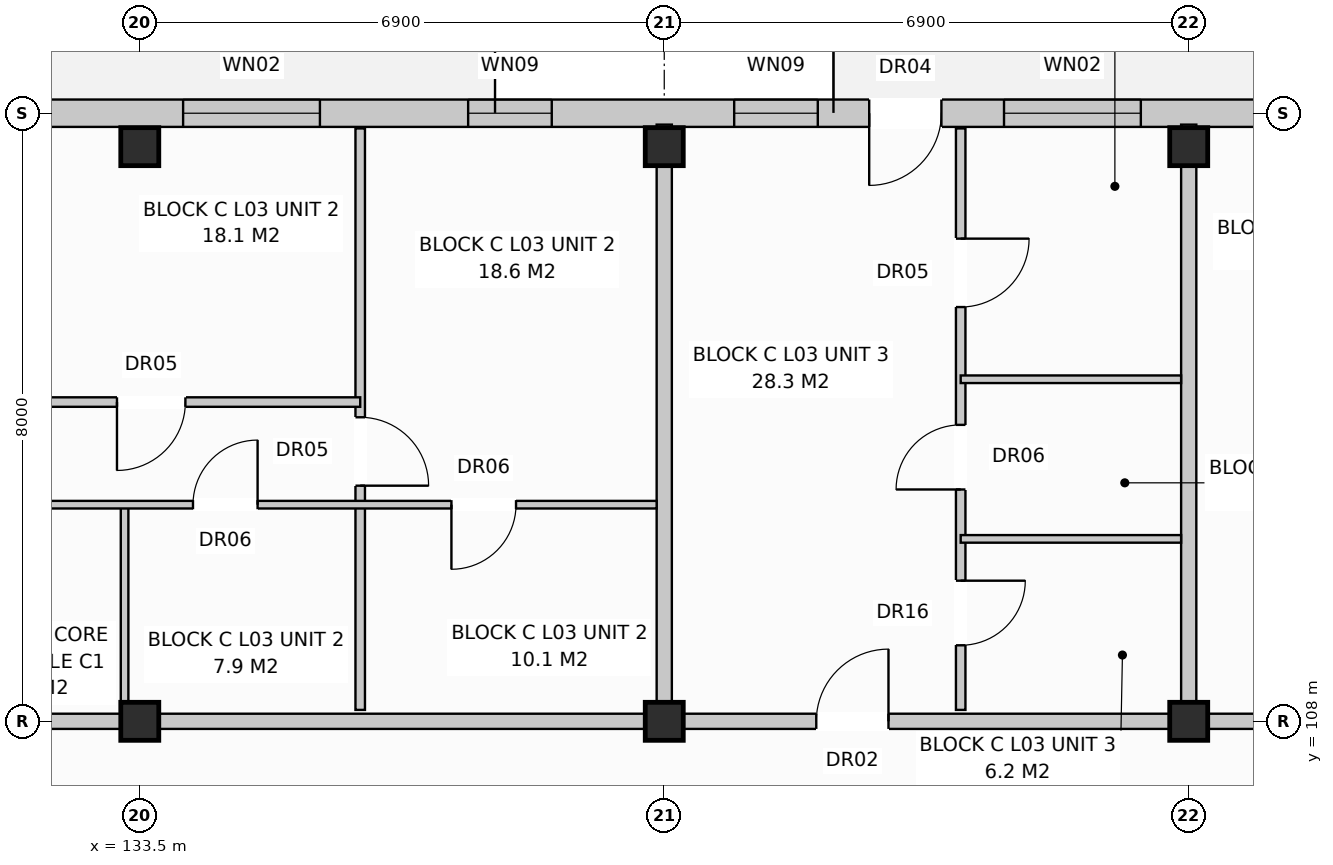
"""IFC4 building model, lengths in metres.
Left out: names, types, materials, properties, quantities, classifications, styles, units other than length and angle.
Written with IfcOpenShell. Run it as: python <this file> out.ifc"""

import sys

from ifc_helpers import new_model, si_unit, direction, frame, frame_2d, origin, origin_with_axes, origin_2d, place, context, subcontext, project, spatial, rectangle, extrude, element, fill, save


model = new_model("IFC4")
c1 = context("Model", 3, precision=1e-05, world=origin(), true_north=direction((0.0, 1.0)))
c2 = subcontext(c1, "Body", "Model", "MODEL_VIEW")
j1 = project(units=[si_unit("LENGTHUNIT", "METRE"), si_unit("PLANEANGLEUNIT", "RADIAN")], contexts=[c1])
p1 = place(None, origin())
s1 = spatial("IfcSite", under=j1, at=p1, CompositionType="ELEMENT")
p2 = place(p1, origin())
s2 = spatial("IfcBuilding", under=s1, at=p2, CompositionType="ELEMENT")
p3 = place(p2, frame((0.0, 0.0, 11.2)))
s3 = spatial("IfcBuildingStorey", under=s2, at=p3, CompositionType="ELEMENT", Elevation=11.2)
for number, where, z_axis, x_axis in (
    (1, (133.5, 108.0, 0.0), (0.0, 0.0, 1.0), (1.0, 0.0, 0.0)),
    (2, (133.5, 115.56, 0.0), (0.0, 0.0, 1.0), (1.0, 0.0, 0.0)),
    (3, (140.4, 108.0, 0.0), (0.0, 0.0, 1.0), (1.0, 0.0, 0.0)),
    (4, (140.4, 115.56, 0.0), (0.0, 0.0, 1.0), (1.0, 0.0, 0.0)),
    (5, (147.3, 108.0, 0.0), (0.0, 0.0, 1.0), (1.0, 0.0, 0.0)),
    (6, (147.3, 115.56, 0.0), (0.0, 0.0, 1.0), (1.0, 0.0, 0.0)),
):
    element("IfcColumn", number, at=place(p3, frame(where, z_axis=z_axis, x_axis=x_axis)), inside=s3, PredefinedType="COLUMN", context=c2, shape_type="SweptSolid", body=[
        extrude(rectangle(XDim=0.5, YDim=0.5, at=origin_2d()), origin(), (0.0, 0.0, 1.0), 3.2),
    ])
p4 = place(p3, frame((112.97, 116.0, 0.0), z_axis=(0.0, 0.0, 1.0), x_axis=(1.0, 0.0, 0.0)))
e7 = element("IfcWall", 7, at=p4, inside=s3, PredefinedType="STANDARD", context=c2, shape_type="SweptSolid", body=[
    extrude(rectangle(XDim=54.86, YDim=0.36, at=frame_2d((27.43, 0.0))), origin(), (0.0, 0.0, 1.0), 2.94),
])
p5 = place(p4, frame((2.497, 0.0, 0.0)))
e8 = element("IfcOpeningElement", 8, at=p5, cuts=e7, PredefinedType="OPENING", context=c2, shape_type="SweptSolid", body=[
    extrude(rectangle(XDim=0.95, YDim=2.1, at=frame_2d((0.475, 1.05))), frame((0.0, 0.192, 0.0), z_axis=(0.0, -1.0, 0.0), x_axis=(1.0, 0.0, 0.0)), (0.0, 0.0, 1.0), 0.384),
])
p6 = place(p4, frame((17.026, 0.0, 0.0)))
e9 = element("IfcOpeningElement", 9, at=p6, cuts=e7, PredefinedType="OPENING", context=c2, shape_type="SweptSolid", body=[
    extrude(rectangle(XDim=0.95, YDim=2.1, at=frame_2d((0.475, 1.05))), frame((0.0, 0.192, 0.0), z_axis=(0.0, -1.0, 0.0), x_axis=(1.0, 0.0, 0.0)), (0.0, 0.0, 1.0), 0.384),
])
p7 = place(p4, frame((30.126, 0.0, 0.0)))
e10 = element("IfcOpeningElement", 10, at=p7, cuts=e7, PredefinedType="OPENING", context=c2, shape_type="SweptSolid", body=[
    extrude(rectangle(XDim=0.95, YDim=2.1, at=frame_2d((0.475, 1.05))), frame((0.0, 0.192, 0.0), z_axis=(0.0, -1.0, 0.0), x_axis=(1.0, 0.0, 0.0)), (0.0, 0.0, 1.0), 0.384),
])
p8 = place(p4, frame((44.226, 0.0, 0.0)))
e11 = element("IfcOpeningElement", 11, at=p8, cuts=e7, PredefinedType="OPENING", context=c2, shape_type="SweptSolid", body=[
    extrude(rectangle(XDim=0.95, YDim=2.1, at=frame_2d((0.475, 1.05))), frame((0.0, 0.192, 0.0), z_axis=(0.0, -1.0, 0.0), x_axis=(1.0, 0.0, 0.0)), (0.0, 0.0, 1.0), 0.384),
])
p9 = place(p4, frame((0.645, 0.0, 0.85)))
e12 = element("IfcOpeningElement", 12, at=p9, cuts=e7, PredefinedType="OPENING", context=c2, shape_type="SweptSolid", body=[
    extrude(rectangle(XDim=1.55, YDim=1.55, at=frame_2d((0.775, 0.775))), frame((0.0, 0.192, 0.0), z_axis=(0.0, -1.0, 0.0), x_axis=(1.0, 0.0, 0.0)), (0.0, 0.0, 1.0), 0.384),
])
p10 = place(p4, frame((4.3, 0.0, 0.8)))
e13 = element("IfcOpeningElement", 13, at=p10, cuts=e7, PredefinedType="OPENING", context=c2, shape_type="SweptSolid", body=[
    extrude(rectangle(XDim=1.8, YDim=1.7, at=frame_2d((0.9, 0.85))), frame((0.0, 0.192, 0.0), z_axis=(0.0, -1.0, 0.0), x_axis=(1.0, 0.0, 0.0)), (0.0, 0.0, 1.0), 0.384),
])
p11 = place(p4, frame((9.35, 0.0, 0.72)))
e14 = element("IfcOpeningElement", 14, at=p11, cuts=e7, PredefinedType="OPENING", context=c2, shape_type="SweptSolid", body=[
    extrude(rectangle(XDim=1.1, YDim=1.5, at=frame_2d((0.55, 0.75))), frame((0.0, 0.192, 0.0), z_axis=(0.0, -1.0, 0.0), x_axis=(1.0, 0.0, 0.0)), (0.0, 0.0, 1.0), 0.384),
])
p12 = place(p4, frame((15.05, 0.0, 0.72)))
e15 = element("IfcOpeningElement", 15, at=p12, cuts=e7, PredefinedType="OPENING", context=c2, shape_type="SweptSolid", body=[
    extrude(rectangle(XDim=1.1, YDim=1.5, at=frame_2d((0.55, 0.75))), frame((0.0, 0.192, 0.0), z_axis=(0.0, -1.0, 0.0), x_axis=(1.0, 0.0, 0.0)), (0.0, 0.0, 1.0), 0.384),
])
p13 = place(p4, frame((21.1, 0.0, 0.8)))
e16 = element("IfcOpeningElement", 16, at=p13, cuts=e7, PredefinedType="OPENING", context=c2, shape_type="SweptSolid", body=[
    extrude(rectangle(XDim=1.8, YDim=1.7, at=frame_2d((0.9, 0.85))), frame((0.0, 0.192, 0.0), z_axis=(0.0, -1.0, 0.0), x_axis=(1.0, 0.0, 0.0)), (0.0, 0.0, 1.0), 0.384),
])
p14 = place(p4, frame((24.85, 0.0, 0.72)))
e17 = element("IfcOpeningElement", 17, at=p14, cuts=e7, PredefinedType="OPENING", context=c2, shape_type="SweptSolid", body=[
    extrude(rectangle(XDim=1.1, YDim=1.5, at=frame_2d((0.55, 0.75))), frame((0.0, 0.192, 0.0), z_axis=(0.0, -1.0, 0.0), x_axis=(1.0, 0.0, 0.0)), (0.0, 0.0, 1.0), 0.384),
])
p15 = place(p4, frame((28.35, 0.0, 0.72)))
e18 = element("IfcOpeningElement", 18, at=p15, cuts=e7, PredefinedType="OPENING", context=c2, shape_type="SweptSolid", body=[
    extrude(rectangle(XDim=1.1, YDim=1.5, at=frame_2d((0.55, 0.75))), frame((0.0, 0.192, 0.0), z_axis=(0.0, -1.0, 0.0), x_axis=(1.0, 0.0, 0.0)), (0.0, 0.0, 1.0), 0.384),
])
p16 = place(p4, frame((31.9, 0.0, 0.8)))
e19 = element("IfcOpeningElement", 19, at=p16, cuts=e7, PredefinedType="OPENING", context=c2, shape_type="SweptSolid", body=[
    extrude(rectangle(XDim=1.8, YDim=1.7, at=frame_2d((0.9, 0.85))), frame((0.0, 0.192, 0.0), z_axis=(0.0, -1.0, 0.0), x_axis=(1.0, 0.0, 0.0)), (0.0, 0.0, 1.0), 0.384),
])
p17 = place(p4, frame((35.55, 0.0, 0.72)))
e20 = element("IfcOpeningElement", 20, at=p17, cuts=e7, PredefinedType="OPENING", context=c2, shape_type="SweptSolid", body=[
    extrude(rectangle(XDim=1.9, YDim=1.85, at=frame_2d((0.95, 0.925))), frame((0.0, 0.192, 0.0), z_axis=(0.0, -1.0, 0.0), x_axis=(1.0, 0.0, 0.0)), (0.0, 0.0, 1.0), 0.384),
])
p18 = place(p4, frame((39.25, 0.0, 0.72)))
e21 = element("IfcOpeningElement", 21, at=p18, cuts=e7, PredefinedType="OPENING", context=c2, shape_type="SweptSolid", body=[
    extrude(rectangle(XDim=1.1, YDim=1.5, at=frame_2d((0.55, 0.75))), frame((0.0, 0.192, 0.0), z_axis=(0.0, -1.0, 0.0), x_axis=(1.0, 0.0, 0.0)), (0.0, 0.0, 1.0), 0.384),
])
p19 = place(p4, frame((42.45, 0.0, 0.72)))
e22 = element("IfcOpeningElement", 22, at=p19, cuts=e7, PredefinedType="OPENING", context=c2, shape_type="SweptSolid", body=[
    extrude(rectangle(XDim=1.1, YDim=1.5, at=frame_2d((0.55, 0.75))), frame((0.0, 0.192, 0.0), z_axis=(0.0, -1.0, 0.0), x_axis=(1.0, 0.0, 0.0)), (0.0, 0.0, 1.0), 0.384),
])
p20 = place(p4, frame((45.75, 0.0, 0.72)))
e23 = element("IfcOpeningElement", 23, at=p20, cuts=e7, PredefinedType="OPENING", context=c2, shape_type="SweptSolid", body=[
    extrude(rectangle(XDim=1.9, YDim=1.85, at=frame_2d((0.95, 0.925))), frame((0.0, 0.192, 0.0), z_axis=(0.0, -1.0, 0.0), x_axis=(1.0, 0.0, 0.0)), (0.0, 0.0, 1.0), 0.384),
])
p21 = place(p4, frame((51.85, 0.0, 0.72)))
e24 = element("IfcOpeningElement", 24, at=p21, cuts=e7, PredefinedType="OPENING", context=c2, shape_type="SweptSolid", body=[
    extrude(rectangle(XDim=1.1, YDim=1.5, at=frame_2d((0.55, 0.75))), frame((0.0, 0.192, 0.0), z_axis=(0.0, -1.0, 0.0), x_axis=(1.0, 0.0, 0.0)), (0.0, 0.0, 1.0), 0.384),
])
p22 = place(p3, frame((140.4, 108.15, 0.0), z_axis=(0.0, 0.0, 1.0), x_axis=(0.0, 1.0, 0.0)))
e25 = element("IfcWall", 25, at=p22, inside=s3, PredefinedType="PARTITIONING", context=c2, shape_type="SweptSolid", body=[
    extrude(rectangle(XDim=7.7, YDim=0.2, at=frame_2d((3.85, 0.0))), origin(), (0.0, 0.0, 1.0), 2.94),
])
p23 = place(p3, frame((119.7, 108.0, 0.0), z_axis=(0.0, 0.0, 1.0), x_axis=(1.0, 0.0, 0.0)))
e26 = element("IfcWall", 26, at=p23, inside=s3, PredefinedType="PARTITIONING", context=c2, shape_type="SweptSolid", body=[
    extrude(rectangle(XDim=20.7, YDim=0.2, at=frame_2d((10.35, 0.0))), origin(), (0.0, 0.0, 1.0), 2.38),
])
p24 = place(p23, frame((2.4, 0.0, 0.0)))
e27 = element("IfcOpeningElement", 27, at=p24, cuts=e26, PredefinedType="OPENING", context=c2, shape_type="SweptSolid", body=[
    extrude(rectangle(XDim=0.95, YDim=2.15, at=frame_2d((0.475, 1.075))), frame((0.0, 0.112, 0.0), z_axis=(0.0, -1.0, 0.0), x_axis=(1.0, 0.0, 0.0)), (0.0, 0.0, 1.0), 0.224),
])
p25 = place(p3, frame((133.3, 108.15, 0.0), z_axis=(0.0, 0.0, 1.0), x_axis=(0.0, 1.0, 0.0)))
e28 = element("IfcWall", 28, at=p25, inside=s3, PredefinedType="PARTITIONING", context=c2, shape_type="SweptSolid", body=[
    extrude(rectangle(XDim=2.7, YDim=0.1, at=frame_2d((1.35, 0.0))), origin(), (0.0, 0.0, 1.0), 2.94),
])
p26 = place(p3, frame((136.4, 108.15, 0.0), z_axis=(0.0, 0.0, 1.0), x_axis=(0.0, 1.0, 0.0)))
e29 = element("IfcWall", 29, at=p26, inside=s3, PredefinedType="PARTITIONING", context=c2, shape_type="SweptSolid", body=[
    extrude(rectangle(XDim=7.65, YDim=0.125, at=frame_2d((3.825, 0.0))), origin(), (0.0, 0.0, 1.0), 2.94),
])
p27 = place(p26, frame((2.95, 0.0, 0.0)))
e30 = element("IfcOpeningElement", 30, at=p27, cuts=e29, PredefinedType="OPENING", context=c2, shape_type="SweptSolid", body=[
    extrude(rectangle(XDim=0.9, YDim=2.1, at=frame_2d((0.45, 1.05))), frame((0.0, 0.074, 0.0), z_axis=(0.0, -1.0, 0.0), x_axis=(1.0, 0.0, 0.0)), (0.0, 0.0, 1.0), 0.149),
])
p28 = place(p3, frame((126.0, 110.85, 0.0), z_axis=(0.0, 0.0, 1.0), x_axis=(1.0, 0.0, 0.0)))
e31 = element("IfcWall", 31, at=p28, inside=s3, PredefinedType="PARTITIONING", context=c2, shape_type="SweptSolid", body=[
    extrude(rectangle(XDim=14.3, YDim=0.1, at=frame_2d((7.15, 0.0))), origin(), (0.0, 0.0, 1.0), 2.94),
])
p29 = place(p28, frame((1.6, 0.0, 0.0)))
e32 = element("IfcOpeningElement", 32, at=p29, cuts=e31, PredefinedType="OPENING", context=c2, shape_type="SweptSolid", body=[
    extrude(rectangle(XDim=0.9, YDim=2.1, at=frame_2d((0.45, 1.05))), frame((0.0, 0.062, 0.0), z_axis=(0.0, -1.0, 0.0), x_axis=(1.0, 0.0, 0.0)), (0.0, 0.0, 1.0), 0.124),
])
p30 = place(p28, frame((5.1, 0.0, 0.0)))
e33 = element("IfcOpeningElement", 33, at=p30, cuts=e31, PredefinedType="OPENING", context=c2, shape_type="SweptSolid", body=[
    extrude(rectangle(XDim=0.85, YDim=2.05, at=frame_2d((0.425, 1.025))), frame((0.0, 0.062, 0.0), z_axis=(0.0, -1.0, 0.0), x_axis=(1.0, 0.0, 0.0)), (0.0, 0.0, 1.0), 0.124),
])
p31 = place(p28, frame((8.2, 0.0, 0.0)))
e34 = element("IfcOpeningElement", 34, at=p31, cuts=e31, PredefinedType="OPENING", context=c2, shape_type="SweptSolid", body=[
    extrude(rectangle(XDim=0.85, YDim=2.05, at=frame_2d((0.425, 1.025))), frame((0.0, 0.062, 0.0), z_axis=(0.0, -1.0, 0.0), x_axis=(1.0, 0.0, 0.0)), (0.0, 0.0, 1.0), 0.124),
])
p32 = place(p28, frame((11.6, 0.0, 0.0)))
e35 = element("IfcOpeningElement", 35, at=p32, cuts=e31, PredefinedType="OPENING", context=c2, shape_type="SweptSolid", body=[
    extrude(rectangle(XDim=0.85, YDim=2.05, at=frame_2d((0.425, 1.025))), frame((0.0, 0.062, 0.0), z_axis=(0.0, -1.0, 0.0), x_axis=(1.0, 0.0, 0.0)), (0.0, 0.0, 1.0), 0.124),
])
p33 = place(p3, frame((126.0, 112.2, 0.0), z_axis=(0.0, 0.0, 1.0), x_axis=(1.0, 0.0, 0.0)))
e36 = element("IfcWall", 36, at=p33, inside=s3, PredefinedType="PARTITIONING", context=c2, shape_type="SweptSolid", body=[
    extrude(rectangle(XDim=10.4, YDim=0.125, at=frame_2d((5.2, 0.0))), origin(), (0.0, 0.0, 1.0), 2.94),
])
p34 = place(p33, frame((2.0, 0.0, 0.0)))
e37 = element("IfcOpeningElement", 37, at=p34, cuts=e36, PredefinedType="OPENING", context=c2, shape_type="SweptSolid", body=[
    extrude(rectangle(XDim=0.9, YDim=2.1, at=frame_2d((0.45, 1.05))), frame((0.0, 0.074, 0.0), z_axis=(0.0, -1.0, 0.0), x_axis=(1.0, 0.0, 0.0)), (0.0, 0.0, 1.0), 0.149),
])
p35 = place(p33, frame((7.2, 0.0, 0.0)))
e38 = element("IfcOpeningElement", 38, at=p35, cuts=e36, PredefinedType="OPENING", context=c2, shape_type="SweptSolid", body=[
    extrude(rectangle(XDim=0.9, YDim=2.1, at=frame_2d((0.45, 1.05))), frame((0.0, 0.074, 0.0), z_axis=(0.0, -1.0, 0.0), x_axis=(1.0, 0.0, 0.0)), (0.0, 0.0, 1.0), 0.149),
])
p36 = place(p3, frame((147.3, 108.15, 0.0), z_axis=(0.0, 0.0, 1.0), x_axis=(0.0, 1.0, 0.0)))
e39 = element("IfcWall", 39, at=p36, inside=s3, PredefinedType="PARTITIONING", context=c2, shape_type="SweptSolid", body=[
    extrude(rectangle(XDim=7.7, YDim=0.2, at=frame_2d((3.85, 0.0))), origin(), (0.0, 0.0, 1.0), 2.94),
])
p37 = place(p3, frame((140.4, 108.0, 0.0), z_axis=(0.0, 0.0, 1.0), x_axis=(1.0, 0.0, 0.0)))
e40 = element("IfcWall", 40, at=p37, inside=s3, PredefinedType="PARTITIONING", context=c2, shape_type="SweptSolid", body=[
    extrude(rectangle(XDim=6.9, YDim=0.2, at=frame_2d((3.45, 0.0))), origin(), (0.0, 0.0, 1.0), 2.38),
])
p38 = place(p37, frame((2.0, 0.0, 0.0)))
e41 = element("IfcOpeningElement", 41, at=p38, cuts=e40, PredefinedType="OPENING", context=c2, shape_type="SweptSolid", body=[
    extrude(rectangle(XDim=0.95, YDim=2.15, at=frame_2d((0.475, 1.075))), frame((0.0, 0.112, 0.0), z_axis=(0.0, -1.0, 0.0), x_axis=(1.0, 0.0, 0.0)), (0.0, 0.0, 1.0), 0.224),
])
p39 = place(p3, frame((144.3, 108.15, 0.0), z_axis=(0.0, 0.0, 1.0), x_axis=(0.0, 1.0, 0.0)))
e42 = element("IfcWall", 42, at=p39, inside=s3, PredefinedType="PARTITIONING", context=c2, shape_type="SweptSolid", body=[
    extrude(rectangle(XDim=7.65, YDim=0.125, at=frame_2d((3.825, 0.0))), origin(), (0.0, 0.0, 1.0), 2.94),
])
p40 = place(p39, frame((0.85, 0.0, 0.0)))
e43 = element("IfcOpeningElement", 43, at=p40, cuts=e42, PredefinedType="OPENING", context=c2, shape_type="SweptSolid", body=[
    extrude(rectangle(XDim=0.85, YDim=2.1, at=frame_2d((0.425, 1.05))), frame((0.0, 0.074, 0.0), z_axis=(0.0, -1.0, 0.0), x_axis=(1.0, 0.0, 0.0)), (0.0, 0.0, 1.0), 0.149),
])
p41 = place(p39, frame((2.9, 0.0, 0.0)))
e44 = element("IfcOpeningElement", 44, at=p41, cuts=e42, PredefinedType="OPENING", context=c2, shape_type="SweptSolid", body=[
    extrude(rectangle(XDim=0.85, YDim=2.05, at=frame_2d((0.425, 1.025))), frame((0.0, 0.074, 0.0), z_axis=(0.0, -1.0, 0.0), x_axis=(1.0, 0.0, 0.0)), (0.0, 0.0, 1.0), 0.149),
])
p42 = place(p39, frame((5.3, 0.0, 0.0)))
e45 = element("IfcOpeningElement", 45, at=p42, cuts=e42, PredefinedType="OPENING", context=c2, shape_type="SweptSolid", body=[
    extrude(rectangle(XDim=0.9, YDim=2.1, at=frame_2d((0.45, 1.05))), frame((0.0, 0.074, 0.0), z_axis=(0.0, -1.0, 0.0), x_axis=(1.0, 0.0, 0.0)), (0.0, 0.0, 1.0), 0.149),
])
for number, where, z_axis, x_axis in (
    (46, (144.3, 110.4, 0.0), (0.0, 0.0, 1.0), (1.0, 0.0, 0.0)),
    (47, (144.3, 112.5, 0.0), (0.0, 0.0, 1.0), (1.0, 0.0, 0.0)),
):
    element("IfcWall", number, at=place(p3, frame(where, z_axis=z_axis, x_axis=x_axis)), inside=s3, PredefinedType="PARTITIONING", context=c2, shape_type="SweptSolid", body=[
        extrude(rectangle(XDim=2.9, YDim=0.1, at=frame_2d((1.45, 0.0))), origin(), (0.0, 0.0, 1.0), 2.94),
    ])
p43 = place(p3, frame((147.3, 108.0, 0.0), z_axis=(0.0, 0.0, 1.0), x_axis=(1.0, 0.0, 0.0)))
e48 = element("IfcWall", 48, at=p43, inside=s3, PredefinedType="PARTITIONING", context=c2, shape_type="SweptSolid", body=[
    extrude(rectangle(XDim=6.9, YDim=0.2, at=frame_2d((3.45, 0.0))), origin(), (0.0, 0.0, 1.0), 2.38),
])
p44 = place(p43, frame((2.0, 0.0, 0.0)))
e49 = element("IfcOpeningElement", 49, at=p44, cuts=e48, PredefinedType="OPENING", context=c2, shape_type="SweptSolid", body=[
    extrude(rectangle(XDim=0.95, YDim=2.15, at=frame_2d((0.475, 1.075))), frame((0.0, 0.112, 0.0), z_axis=(0.0, -1.0, 0.0), x_axis=(1.0, 0.0, 0.0)), (0.0, 0.0, 1.0), 0.224),
])
p45 = place(p7, frame((0.95, 0.0, 0.0), z_axis=(0.0, 0.0, 1.0), x_axis=(-1.0, 0.0, 0.0)))
e50 = element("IfcDoor", 50, at=p45, inside=s3, OperationType="SINGLE_SWING_LEFT", PredefinedType="DOOR", context=c2, shape_type="SweptSolid", body=[
    extrude(rectangle(XDim=0.95, YDim=2.1, at=frame_2d((0.475, 1.05))), frame((0.0, 0.025, 0.0), z_axis=(0.0, -1.0, 0.0), x_axis=(1.0, 0.0, 0.0)), (0.0, 0.0, 1.0), 0.05),
])
fill(e10, e50)
p46 = place(p13, origin_with_axes())
e51 = element("IfcWindow", 51, at=p46, inside=s3, PartitioningType="SINGLE_PANEL", PredefinedType="WINDOW", context=c2, shape_type="SweptSolid", body=[
    extrude(rectangle(XDim=1.8, YDim=1.7, at=frame_2d((0.9, 0.85))), frame((0.0, 0.03, 0.0), z_axis=(0.0, -1.0, 0.0), x_axis=(1.0, 0.0, 0.0)), (0.0, 0.0, 1.0), 0.06),
])
fill(e16, e51)
p47 = place(p14, origin_with_axes())
e52 = element("IfcWindow", 52, at=p47, inside=s3, PartitioningType="SINGLE_PANEL", PredefinedType="WINDOW", context=c2, shape_type="SweptSolid", body=[
    extrude(rectangle(XDim=1.1, YDim=1.5, at=frame_2d((0.55, 0.75))), frame((0.0, 0.03, 0.0), z_axis=(0.0, -1.0, 0.0), x_axis=(1.0, 0.0, 0.0)), (0.0, 0.0, 1.0), 0.06),
])
fill(e17, e52)
p48 = place(p15, origin_with_axes())
e53 = element("IfcWindow", 53, at=p48, inside=s3, PartitioningType="SINGLE_PANEL", PredefinedType="WINDOW", context=c2, shape_type="SweptSolid", body=[
    extrude(rectangle(XDim=1.1, YDim=1.5, at=frame_2d((0.55, 0.75))), frame((0.0, 0.03, 0.0), z_axis=(0.0, -1.0, 0.0), x_axis=(1.0, 0.0, 0.0)), (0.0, 0.0, 1.0), 0.06),
])
fill(e18, e53)
p49 = place(p16, origin_with_axes())
e54 = element("IfcWindow", 54, at=p49, inside=s3, PartitioningType="SINGLE_PANEL", PredefinedType="WINDOW", context=c2, shape_type="SweptSolid", body=[
    extrude(rectangle(XDim=1.8, YDim=1.7, at=frame_2d((0.9, 0.85))), frame((0.0, 0.03, 0.0), z_axis=(0.0, -1.0, 0.0), x_axis=(1.0, 0.0, 0.0)), (0.0, 0.0, 1.0), 0.06),
])
fill(e19, e54)
p50 = place(p27, frame((0.9, 0.0, 0.0), z_axis=(0.0, 0.0, 1.0), x_axis=(-1.0, 0.0, 0.0)))
e55 = element("IfcDoor", 55, at=p50, inside=s3, OperationType="SINGLE_SWING_LEFT", PredefinedType="DOOR", context=c2, shape_type="SweptSolid", body=[
    extrude(rectangle(XDim=0.9, YDim=2.1, at=frame_2d((0.45, 1.05))), frame((0.0, 0.025, 0.0), z_axis=(0.0, -1.0, 0.0), x_axis=(1.0, 0.0, 0.0)), (0.0, 0.0, 1.0), 0.05),
])
fill(e30, e55)
p51 = place(p31, origin_with_axes())
e56 = element("IfcDoor", 56, at=p51, inside=s3, OperationType="SINGLE_SWING_RIGHT", PredefinedType="DOOR", context=c2, shape_type="SweptSolid", body=[
    extrude(rectangle(XDim=0.85, YDim=2.05, at=frame_2d((0.425, 1.025))), frame((0.0, 0.025, 0.0), z_axis=(0.0, -1.0, 0.0), x_axis=(1.0, 0.0, 0.0)), (0.0, 0.0, 1.0), 0.05),
])
fill(e34, e56)
p52 = place(p32, frame((0.85, 0.0, 0.0), z_axis=(0.0, 0.0, 1.0), x_axis=(-1.0, 0.0, 0.0)))
e57 = element("IfcDoor", 57, at=p52, inside=s3, OperationType="SINGLE_SWING_LEFT", PredefinedType="DOOR", context=c2, shape_type="SweptSolid", body=[
    extrude(rectangle(XDim=0.85, YDim=2.05, at=frame_2d((0.425, 1.025))), frame((0.0, 0.025, 0.0), z_axis=(0.0, -1.0, 0.0), x_axis=(1.0, 0.0, 0.0)), (0.0, 0.0, 1.0), 0.05),
])
fill(e35, e57)
p53 = place(p35, frame((0.9, 0.0, 0.0), z_axis=(0.0, 0.0, 1.0), x_axis=(-1.0, 0.0, 0.0)))
e58 = element("IfcDoor", 58, at=p53, inside=s3, OperationType="SINGLE_SWING_LEFT", PredefinedType="DOOR", context=c2, shape_type="SweptSolid", body=[
    extrude(rectangle(XDim=0.9, YDim=2.1, at=frame_2d((0.45, 1.05))), frame((0.0, 0.025, 0.0), z_axis=(0.0, -1.0, 0.0), x_axis=(1.0, 0.0, 0.0)), (0.0, 0.0, 1.0), 0.05),
])
fill(e38, e58)
p54 = place(p38, origin_with_axes())
e59 = element("IfcDoor", 59, at=p54, inside=s3, OperationType="SINGLE_SWING_RIGHT", PredefinedType="DOOR", context=c2, shape_type="SweptSolid", body=[
    extrude(rectangle(XDim=0.95, YDim=2.15, at=frame_2d((0.475, 1.075))), frame((0.0, 0.025, 0.0), z_axis=(0.0, -1.0, 0.0), x_axis=(1.0, 0.0, 0.0)), (0.0, 0.0, 1.0), 0.05),
])
fill(e41, e59)
p55 = place(p40, frame((0.85, 0.0, 0.0), z_axis=(0.0, 0.0, 1.0), x_axis=(-1.0, 0.0, 0.0)))
e60 = element("IfcDoor", 60, at=p55, inside=s3, OperationType="SINGLE_SWING_RIGHT", PredefinedType="DOOR", context=c2, shape_type="SweptSolid", body=[
    extrude(rectangle(XDim=0.85, YDim=2.1, at=frame_2d((0.425, 1.05))), frame((0.0, 0.025, 0.0), z_axis=(0.0, -1.0, 0.0), x_axis=(1.0, 0.0, 0.0)), (0.0, 0.0, 1.0), 0.05),
])
fill(e43, e60)
p56 = place(p41, origin_with_axes())
e61 = element("IfcDoor", 61, at=p56, inside=s3, OperationType="SINGLE_SWING_LEFT", PredefinedType="DOOR", context=c2, shape_type="SweptSolid", body=[
    extrude(rectangle(XDim=0.85, YDim=2.05, at=frame_2d((0.425, 1.025))), frame((0.0, 0.025, 0.0), z_axis=(0.0, -1.0, 0.0), x_axis=(1.0, 0.0, 0.0)), (0.0, 0.0, 1.0), 0.05),
])
fill(e44, e61)
p57 = place(p42, frame((0.9, 0.0, 0.0), z_axis=(0.0, 0.0, 1.0), x_axis=(-1.0, 0.0, 0.0)))
e62 = element("IfcDoor", 62, at=p57, inside=s3, OperationType="SINGLE_SWING_RIGHT", PredefinedType="DOOR", context=c2, shape_type="SweptSolid", body=[
    extrude(rectangle(XDim=0.9, YDim=2.1, at=frame_2d((0.45, 1.05))), frame((0.0, 0.025, 0.0), z_axis=(0.0, -1.0, 0.0), x_axis=(1.0, 0.0, 0.0)), (0.0, 0.0, 1.0), 0.05),
])
fill(e45, e62)
save(model, sys.argv[1])
